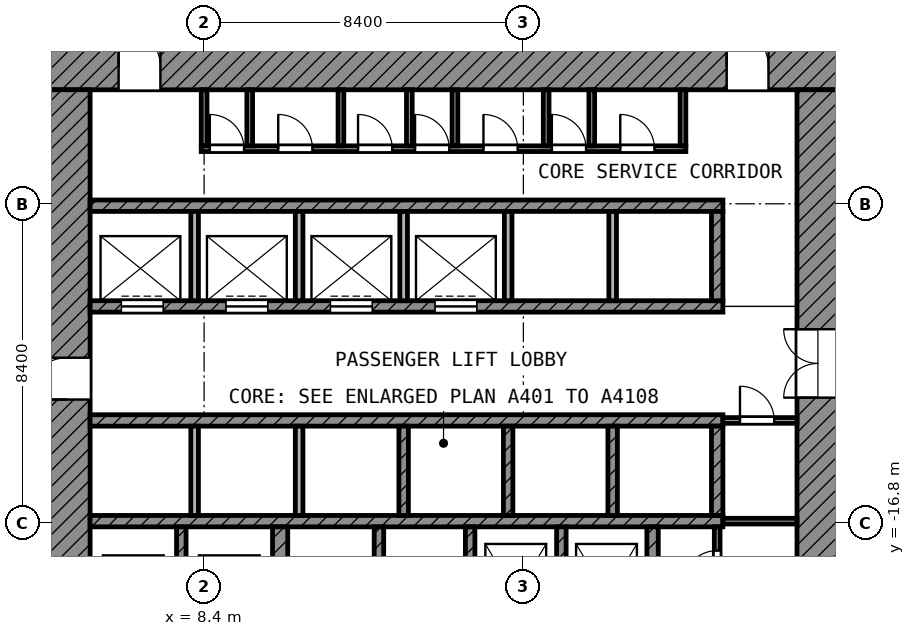
"""IFC4 building model, lengths in metres.
Left out: names, types, materials, properties, quantities, classifications, styles, units other than length and angle.
Written with IfcOpenShell. Run it as: python <this file> out.ifc"""

import sys

from ifc_helpers import new_model, si_unit, direction, frame, frame_2d, origin, place, context, subcontext, project, spatial, rectangle, extrude, element, fill, save


model = new_model("IFC4")
c1 = context("Model", 3, precision=1e-05, world=origin(), true_north=direction((0.0, 1.0)))
c2 = subcontext(c1, "Body", "Model", "MODEL_VIEW")
j1 = project(units=[si_unit("LENGTHUNIT", "METRE"), si_unit("PLANEANGLEUNIT", "RADIAN")], contexts=[c1])
p1 = place(None, origin())
s1 = spatial("IfcSite", under=j1, at=p1, CompositionType="ELEMENT")
p2 = place(p1, origin())
s2 = spatial("IfcBuilding", under=s1, at=p2, CompositionType="ELEMENT")
p3 = place(p2, frame((0.0, 0.0, 47.6)))
s3 = spatial("IfcBuildingStorey", under=s2, at=p3, CompositionType="ELEMENT", Elevation=47.6)
p4 = place(p3, frame((4.2, -4.8, 0.0), z_axis=(0.0, 0.0, 1.0), x_axis=(1.0, 0.0, 0.0)))
e1 = element("IfcWall", 1, at=p4, inside=s3, PredefinedType="SHEAR", context=c2, shape_type="SweptSolid", body=[
    extrude(rectangle(XDim=20.9, YDim=1.2, at=frame_2d((10.45, 0.0))), origin(), (0.0, 0.0, 1.0), 3.78),
])
p5 = place(p4, frame((1.95, 0.0, 0.0)))
e2 = element("IfcOpeningElement", 2, at=p5, cuts=e1, PredefinedType="OPENING", context=c2, shape_type="SweptSolid", body=[
    extrude(rectangle(XDim=1.1, YDim=2.1, at=frame_2d((0.55, 1.05))), frame((0.0, 0.61, 0.0), z_axis=(0.0, -1.0, 0.0), x_axis=(1.0, 0.0, 0.0)), (0.0, 0.0, 1.0), 1.22),
])
p6 = place(p4, frame((17.95, 0.0, 0.0)))
e3 = element("IfcOpeningElement", 3, at=p6, cuts=e1, PredefinedType="OPENING", context=c2, shape_type="SweptSolid", body=[
    extrude(rectangle(XDim=1.1, YDim=2.1, at=frame_2d((0.55, 1.05))), frame((0.0, 0.61, 0.0), z_axis=(0.0, -1.0, 0.0), x_axis=(1.0, 0.0, 0.0)), (0.0, 0.0, 1.0), 1.22),
])
p7 = place(p3, frame((4.8, -25.1, 0.0), z_axis=(0.0, 0.0, 1.0), x_axis=(0.0, 1.0, 0.0)))
e4 = element("IfcWall", 4, at=p7, inside=s3, PredefinedType="SHEAR", context=c2, shape_type="SweptSolid", body=[
    extrude(rectangle(XDim=19.7, YDim=1.2, at=frame_2d((9.85, 0.0))), origin(), (0.0, 0.0, 1.0), 3.78),
])
p8 = place(p7, frame((11.55, 0.0, 0.0)))
e5 = element("IfcOpeningElement", 5, at=p8, cuts=e4, PredefinedType="OPENING", context=c2, shape_type="SweptSolid", body=[
    extrude(rectangle(XDim=1.1, YDim=2.1, at=frame_2d((0.55, 1.05))), frame((0.0, 0.61, 0.0), z_axis=(0.0, -1.0, 0.0), x_axis=(1.0, 0.0, 0.0)), (0.0, 0.0, 1.0), 1.22),
])
p9 = place(p7, frame((2.25, 0.0, 0.0)))
e6 = element("IfcOpeningElement", 6, at=p9, cuts=e4, PredefinedType="OPENING", context=c2, shape_type="SweptSolid", body=[
    extrude(rectangle(XDim=1.1, YDim=2.1, at=frame_2d((0.55, 1.05))), frame((0.0, 0.61, 0.0), z_axis=(0.0, -1.0, 0.0), x_axis=(1.0, 0.0, 0.0)), (0.0, 0.0, 1.0), 1.22),
])
p10 = place(p3, frame((24.55, -24.0, 0.0), z_axis=(0.0, 0.0, 1.0), x_axis=(0.0, 1.0, 0.0)))
e7 = element("IfcWall", 7, at=p10, inside=s3, PredefinedType="SHEAR", context=c2, shape_type="SweptSolid", body=[
    extrude(rectangle(XDim=18.6, YDim=1.1, at=frame_2d((9.3, 0.0))), origin(), (0.0, 0.0, 1.0), 3.78),
])
p11 = place(p10, frame((10.5, 0.0, 0.0)))
e8 = element("IfcOpeningElement", 8, at=p11, cuts=e7, PredefinedType="OPENING", context=c2, shape_type="SweptSolid", body=[
    extrude(rectangle(XDim=1.8, YDim=2.1, at=frame_2d((0.9, 1.05))), frame((0.0, 0.56, 0.0), z_axis=(0.0, -1.0, 0.0), x_axis=(1.0, 0.0, 0.0)), (0.0, 0.0, 1.0), 1.12),
])
p12 = place(p3, frame((5.4, -8.45, 0.0), z_axis=(0.0, 0.0, 1.0), x_axis=(1.0, 0.0, 0.0)))
e9 = element("IfcWall", 9, at=p12, inside=s3, PredefinedType="SHEAR", context=c2, shape_type="SweptSolid", body=[
    extrude(rectangle(XDim=16.65, YDim=0.3, at=frame_2d((8.325, 0.0))), origin(), (0.0, 0.0, 1.0), 3.78),
])
p13 = place(p3, frame((5.4, -11.1, 0.0), z_axis=(0.0, 0.0, 1.0), x_axis=(1.0, 0.0, 0.0)))
e10 = element("IfcWall", 10, at=p13, inside=s3, PredefinedType="SHEAR", context=c2, shape_type="SweptSolid", body=[
    extrude(rectangle(XDim=16.65, YDim=0.3, at=frame_2d((8.325, 0.0))), origin(), (0.0, 0.0, 1.0), 3.78),
])
p14 = place(p13, frame((0.825, 0.0, 0.0)))
e11 = element("IfcOpeningElement", 11, at=p14, cuts=e10, PredefinedType="OPENING", context=c2, shape_type="SweptSolid", body=[
    extrude(rectangle(XDim=1.1, YDim=2.1, at=frame_2d((0.55, 1.05))), frame((0.0, 0.16, 0.0), z_axis=(0.0, -1.0, 0.0), x_axis=(1.0, 0.0, 0.0)), (0.0, 0.0, 1.0), 0.32),
])
p15 = place(p13, frame((3.575, 0.0, 0.0)))
e12 = element("IfcOpeningElement", 12, at=p15, cuts=e10, PredefinedType="OPENING", context=c2, shape_type="SweptSolid", body=[
    extrude(rectangle(XDim=1.1, YDim=2.1, at=frame_2d((0.55, 1.05))), frame((0.0, 0.16, 0.0), z_axis=(0.0, -1.0, 0.0), x_axis=(1.0, 0.0, 0.0)), (0.0, 0.0, 1.0), 0.32),
])
p16 = place(p13, frame((6.325, 0.0, 0.0)))
e13 = element("IfcOpeningElement", 13, at=p16, cuts=e10, PredefinedType="OPENING", context=c2, shape_type="SweptSolid", body=[
    extrude(rectangle(XDim=1.1, YDim=2.1, at=frame_2d((0.55, 1.05))), frame((0.0, 0.16, 0.0), z_axis=(0.0, -1.0, 0.0), x_axis=(1.0, 0.0, 0.0)), (0.0, 0.0, 1.0), 0.32),
])
p17 = place(p13, frame((9.075, 0.0, 0.0)))
e14 = element("IfcOpeningElement", 14, at=p17, cuts=e10, PredefinedType="OPENING", context=c2, shape_type="SweptSolid", body=[
    extrude(rectangle(XDim=1.1, YDim=2.1, at=frame_2d((0.55, 1.05))), frame((0.0, 0.16, 0.0), z_axis=(0.0, -1.0, 0.0), x_axis=(1.0, 0.0, 0.0)), (0.0, 0.0, 1.0), 0.32),
])
for number, where, z_axis, x_axis in (
    (15, (5.4, -14.1, 0.0), (0.0, 0.0, 1.0), (1.0, 0.0, 0.0)),
    (16, (5.4, -16.75, 0.0), (0.0, 0.0, 1.0), (1.0, 0.0, 0.0)),
):
    element("IfcWall", number, at=place(p3, frame(where, z_axis=z_axis, x_axis=x_axis)), inside=s3, PredefinedType="SHEAR", context=c2, shape_type="SweptSolid", body=[
        extrude(rectangle(XDim=16.65, YDim=0.3, at=frame_2d((8.325, 0.0))), origin(), (0.0, 0.0, 1.0), 3.78),
    ])
p18 = place(p3, frame((10.4, -20.05, 0.0), z_axis=(0.0, 0.0, 1.0), x_axis=(0.0, 1.0, 0.0)))
e17 = element("IfcWall", 17, at=p18, inside=s3, PredefinedType="SHEAR", context=c2, shape_type="SweptSolid", body=[
    extrude(rectangle(XDim=3.15, YDim=0.4, at=frame_2d((1.575, 0.0))), origin(), (0.0, 0.0, 1.0), 3.78),
])
p19 = place(p3, frame((20.2, -20.35, 0.0), z_axis=(0.0, 0.0, 1.0), x_axis=(0.0, 1.0, 0.0)))
e18 = element("IfcWall", 18, at=p19, inside=s3, PredefinedType="SHEAR", context=c2, shape_type="SweptSolid", body=[
    extrude(rectangle(XDim=3.45, YDim=0.3, at=frame_2d((1.725, 0.0))), origin(), (0.0, 0.0, 1.0), 3.78),
])
p20 = place(p3, frame((21.9, -10.95, 0.0), z_axis=(0.0, 0.0, 1.0), x_axis=(0.0, 1.0, 0.0)))
e19 = element("IfcWall", 19, at=p20, inside=s3, PredefinedType="SHEAR", context=c2, shape_type="SweptSolid", body=[
    extrude(rectangle(XDim=2.35, YDim=0.3, at=frame_2d((1.175, 0.0))), origin(), (0.0, 0.0, 1.0), 3.78),
])
p21 = place(p3, frame((21.9, -16.6, 0.0), z_axis=(0.0, 0.0, 1.0), x_axis=(0.0, 1.0, 0.0)))
e20 = element("IfcWall", 20, at=p21, inside=s3, PredefinedType="SHEAR", context=c2, shape_type="SweptSolid", body=[
    extrude(rectangle(XDim=2.35, YDim=0.3, at=frame_2d((1.175, 0.0))), origin(), (0.0, 0.0, 1.0), 3.78),
])
for number, where, z_axis, x_axis in (
    (21, (7.8, -20.05, 0.0), (0.0, 0.0, 1.0), (0.0, 1.0, 0.0)),
    (22, (13.0, -20.05, 0.0), (0.0, 0.0, 1.0), (0.0, 1.0, 0.0)),
    (23, (15.4, -20.05, 0.0), (0.0, 0.0, 1.0), (0.0, 1.0, 0.0)),
    (24, (17.8, -20.05, 0.0), (0.0, 0.0, 1.0), (0.0, 1.0, 0.0)),
):
    element("IfcWall", number, at=place(p3, frame(where, z_axis=z_axis, x_axis=x_axis)), inside=s3, PredefinedType="SHEAR", context=c2, shape_type="SweptSolid", body=[
        extrude(rectangle(XDim=3.15, YDim=0.25, at=frame_2d((1.575, 0.0))), origin(), (0.0, 0.0, 1.0), 3.78),
    ])
for number, where, z_axis, x_axis in (
    (25, (8.15, -10.95, 0.0), (0.0, 0.0, 1.0), (0.0, 1.0, 0.0)),
    (26, (10.9, -10.95, 0.0), (0.0, 0.0, 1.0), (0.0, 1.0, 0.0)),
    (27, (13.65, -10.95, 0.0), (0.0, 0.0, 1.0), (0.0, 1.0, 0.0)),
    (28, (16.4, -10.95, 0.0), (0.0, 0.0, 1.0), (0.0, 1.0, 0.0)),
    (29, (19.15, -10.95, 0.0), (0.0, 0.0, 1.0), (0.0, 1.0, 0.0)),
):
    element("IfcWall", number, at=place(p3, frame(where, z_axis=z_axis, x_axis=x_axis)), inside=s3, PredefinedType="PARTITIONING", context=c2, shape_type="SweptSolid", body=[
        extrude(rectangle(XDim=2.35, YDim=0.2, at=frame_2d((1.175, 0.0))), origin(), (0.0, 0.0, 1.0), 3.78),
    ])
for number, where, z_axis, x_axis in (
    (30, (8.15, -16.6, 0.0), (0.0, 0.0, 1.0), (0.0, 1.0, 0.0)),
    (31, (10.9, -16.6, 0.0), (0.0, 0.0, 1.0), (0.0, 1.0, 0.0)),
):
    element("IfcWall", number, at=place(p3, frame(where, z_axis=z_axis, x_axis=x_axis)), inside=s3, PredefinedType="PARTITIONING", context=c2, shape_type="SweptSolid", body=[
        extrude(rectangle(XDim=2.35, YDim=0.2, at=frame_2d((1.175, 0.0))), origin(), (0.0, 0.0, 1.0), 3.78),
    ])
for number, where, z_axis, x_axis in (
    (32, (13.65, -16.6, 0.0), (0.0, 0.0, 1.0), (0.0, 1.0, 0.0)),
    (33, (16.4, -16.6, 0.0), (0.0, 0.0, 1.0), (0.0, 1.0, 0.0)),
    (34, (19.15, -16.6, 0.0), (0.0, 0.0, 1.0), (0.0, 1.0, 0.0)),
):
    element("IfcWall", number, at=place(p3, frame(where, z_axis=z_axis, x_axis=x_axis)), inside=s3, PredefinedType="SHEAR", context=c2, shape_type="SweptSolid", body=[
        extrude(rectangle(XDim=2.35, YDim=0.25, at=frame_2d((1.175, 0.0))), origin(), (0.0, 0.0, 1.0), 3.78),
    ])
p22 = place(p3, frame((21.9, -19.05, 0.0), z_axis=(0.0, 0.0, 1.0), x_axis=(0.0, 1.0, 0.0)))
e35 = element("IfcWall", 35, at=p22, inside=s3, PredefinedType="PARTITIONING", context=c2, shape_type="SweptSolid", body=[
    extrude(rectangle(XDim=2.15, YDim=0.15, at=frame_2d((1.075, 0.0))), origin(), (0.0, 0.0, 1.0), 3.78),
])
p23 = place(p22, frame((0.625, 0.0, 0.0)))
e36 = element("IfcOpeningElement", 36, at=p23, cuts=e35, PredefinedType="OPENING", context=c2, shape_type="SweptSolid", body=[
    extrude(rectangle(XDim=0.9, YDim=2.1, at=frame_2d((0.45, 1.05))), frame((0.0, 0.085, 0.0), z_axis=(0.0, -1.0, 0.0), x_axis=(1.0, 0.0, 0.0)), (0.0, 0.0, 1.0), 0.17),
])
p24 = place(p3, frame((22.05, -16.75, 0.0), z_axis=(0.0, 0.0, 1.0), x_axis=(1.0, 0.0, 0.0)))
e37 = element("IfcWall", 37, at=p24, inside=s3, PredefinedType="PARTITIONING", context=c2, shape_type="SweptSolid", body=[
    extrude(rectangle(XDim=1.95, YDim=0.15, at=frame_2d((0.975, 0.0))), origin(), (0.0, 0.0, 1.0), 3.78),
])
p25 = place(p3, frame((22.05, -14.1, 0.0), z_axis=(0.0, 0.0, 1.0), x_axis=(1.0, 0.0, 0.0)))
e38 = element("IfcWall", 38, at=p25, inside=s3, PredefinedType="PARTITIONING", context=c2, shape_type="SweptSolid", body=[
    extrude(rectangle(XDim=1.95, YDim=0.15, at=frame_2d((0.975, 0.0))), origin(), (0.0, 0.0, 1.0), 3.78),
])
p26 = place(p25, frame((0.45, 0.0, 0.0)))
e39 = element("IfcOpeningElement", 39, at=p26, cuts=e38, PredefinedType="OPENING", context=c2, shape_type="SweptSolid", body=[
    extrude(rectangle(XDim=0.9, YDim=2.1, at=frame_2d((0.45, 1.05))), frame((0.0, 0.085, 0.0), z_axis=(0.0, -1.0, 0.0), x_axis=(1.0, 0.0, 0.0)), (0.0, 0.0, 1.0), 0.17),
])
p27 = place(p3, frame((8.325, -6.95, 0.0), z_axis=(0.0, 0.0, 1.0), x_axis=(1.0, 0.0, 0.0)))
e40 = element("IfcWall", 40, at=p27, inside=s3, PredefinedType="PARTITIONING", context=c2, shape_type="SweptSolid", body=[
    extrude(rectangle(XDim=12.75, YDim=0.15, at=frame_2d((6.375, 0.0))), origin(), (0.0, 0.0, 1.0), 3.78),
])
p28 = place(p27, frame((0.225, 0.0, 0.0)))
e41 = element("IfcOpeningElement", 41, at=p28, cuts=e40, PredefinedType="OPENING", context=c2, shape_type="SweptSolid", body=[
    extrude(rectangle(XDim=0.9, YDim=2.1, at=frame_2d((0.45, 1.05))), frame((0.0, 0.085, 0.0), z_axis=(0.0, -1.0, 0.0), x_axis=(1.0, 0.0, 0.0)), (0.0, 0.0, 1.0), 0.17),
])
p29 = place(p27, frame((2.025, 0.0, 0.0)))
e42 = element("IfcOpeningElement", 42, at=p29, cuts=e40, PredefinedType="OPENING", context=c2, shape_type="SweptSolid", body=[
    extrude(rectangle(XDim=0.9, YDim=2.1, at=frame_2d((0.45, 1.05))), frame((0.0, 0.085, 0.0), z_axis=(0.0, -1.0, 0.0), x_axis=(1.0, 0.0, 0.0)), (0.0, 0.0, 1.0), 0.17),
])
p30 = place(p27, frame((4.125, 0.0, 0.0)))
e43 = element("IfcOpeningElement", 43, at=p30, cuts=e40, PredefinedType="OPENING", context=c2, shape_type="SweptSolid", body=[
    extrude(rectangle(XDim=0.9, YDim=2.1, at=frame_2d((0.45, 1.05))), frame((0.0, 0.085, 0.0), z_axis=(0.0, -1.0, 0.0), x_axis=(1.0, 0.0, 0.0)), (0.0, 0.0, 1.0), 0.17),
])
p31 = place(p27, frame((5.625, 0.0, 0.0)))
e44 = element("IfcOpeningElement", 44, at=p31, cuts=e40, PredefinedType="OPENING", context=c2, shape_type="SweptSolid", body=[
    extrude(rectangle(XDim=0.9, YDim=2.1, at=frame_2d((0.45, 1.05))), frame((0.0, 0.085, 0.0), z_axis=(0.0, -1.0, 0.0), x_axis=(1.0, 0.0, 0.0)), (0.0, 0.0, 1.0), 0.17),
])
p32 = place(p27, frame((7.425, 0.0, 0.0)))
e45 = element("IfcOpeningElement", 45, at=p32, cuts=e40, PredefinedType="OPENING", context=c2, shape_type="SweptSolid", body=[
    extrude(rectangle(XDim=0.9, YDim=2.1, at=frame_2d((0.45, 1.05))), frame((0.0, 0.085, 0.0), z_axis=(0.0, -1.0, 0.0), x_axis=(1.0, 0.0, 0.0)), (0.0, 0.0, 1.0), 0.17),
])
p33 = place(p27, frame((9.225, 0.0, 0.0)))
e46 = element("IfcOpeningElement", 46, at=p33, cuts=e40, PredefinedType="OPENING", context=c2, shape_type="SweptSolid", body=[
    extrude(rectangle(XDim=0.9, YDim=2.1, at=frame_2d((0.45, 1.05))), frame((0.0, 0.085, 0.0), z_axis=(0.0, -1.0, 0.0), x_axis=(1.0, 0.0, 0.0)), (0.0, 0.0, 1.0), 0.17),
])
p34 = place(p27, frame((11.025, 0.0, 0.0)))
e47 = element("IfcOpeningElement", 47, at=p34, cuts=e40, PredefinedType="OPENING", context=c2, shape_type="SweptSolid", body=[
    extrude(rectangle(XDim=0.9, YDim=2.1, at=frame_2d((0.45, 1.05))), frame((0.0, 0.085, 0.0), z_axis=(0.0, -1.0, 0.0), x_axis=(1.0, 0.0, 0.0)), (0.0, 0.0, 1.0), 0.17),
])
for number, where, z_axis, x_axis in (
    (48, (8.4, -6.875, 0.0), (0.0, 0.0, 1.0), (0.0, 1.0, 0.0)),
    (49, (9.6, -6.875, 0.0), (0.0, 0.0, 1.0), (0.0, 1.0, 0.0)),
    (50, (12.0, -6.875, 0.0), (0.0, 0.0, 1.0), (0.0, 1.0, 0.0)),
    (51, (13.8, -6.875, 0.0), (0.0, 0.0, 1.0), (0.0, 1.0, 0.0)),
    (52, (15.0, -6.875, 0.0), (0.0, 0.0, 1.0), (0.0, 1.0, 0.0)),
    (53, (17.4, -6.875, 0.0), (0.0, 0.0, 1.0), (0.0, 1.0, 0.0)),
    (54, (18.6, -6.875, 0.0), (0.0, 0.0, 1.0), (0.0, 1.0, 0.0)),
    (55, (21.0, -6.875, 0.0), (0.0, 0.0, 1.0), (0.0, 1.0, 0.0)),
):
    element("IfcWall", number, at=place(p3, frame(where, z_axis=z_axis, x_axis=x_axis)), inside=s3, PredefinedType="PARTITIONING", context=c2, shape_type="SweptSolid", body=[
        extrude(rectangle(XDim=1.475, YDim=0.15, at=frame_2d((0.738, 0.0))), origin(), (0.0, 0.0, 1.0), 3.78),
    ])
p35 = place(p14, origin())
e56 = element("IfcDoor", 56, at=p35, inside=s3, OperationType="DOUBLE_DOOR_SLIDING", PredefinedType="DOOR", context=c2, shape_type="SweptSolid", body=[
    extrude(rectangle(XDim=1.1, YDim=2.1, at=frame_2d((0.55, 1.05))), frame((0.0, 0.025, 0.0), z_axis=(0.0, -1.0, 0.0), x_axis=(1.0, 0.0, 0.0)), (0.0, 0.0, 1.0), 0.05),
])
fill(e11, e56)
p36 = place(p15, origin())
e57 = element("IfcDoor", 57, at=p36, inside=s3, OperationType="DOUBLE_DOOR_SLIDING", PredefinedType="DOOR", context=c2, shape_type="SweptSolid", body=[
    extrude(rectangle(XDim=1.1, YDim=2.1, at=frame_2d((0.55, 1.05))), frame((0.0, 0.025, 0.0), z_axis=(0.0, -1.0, 0.0), x_axis=(1.0, 0.0, 0.0)), (0.0, 0.0, 1.0), 0.05),
])
fill(e12, e57)
p37 = place(p16, origin())
e58 = element("IfcDoor", 58, at=p37, inside=s3, OperationType="DOUBLE_DOOR_SLIDING", PredefinedType="DOOR", context=c2, shape_type="SweptSolid", body=[
    extrude(rectangle(XDim=1.1, YDim=2.1, at=frame_2d((0.55, 1.05))), frame((0.0, 0.025, 0.0), z_axis=(0.0, -1.0, 0.0), x_axis=(1.0, 0.0, 0.0)), (0.0, 0.0, 1.0), 0.05),
])
fill(e13, e58)
p38 = place(p17, origin())
e59 = element("IfcDoor", 59, at=p38, inside=s3, OperationType="DOUBLE_DOOR_SLIDING", PredefinedType="DOOR", context=c2, shape_type="SweptSolid", body=[
    extrude(rectangle(XDim=1.1, YDim=2.1, at=frame_2d((0.55, 1.05))), frame((0.0, 0.025, 0.0), z_axis=(0.0, -1.0, 0.0), x_axis=(1.0, 0.0, 0.0)), (0.0, 0.0, 1.0), 0.05),
])
fill(e14, e59)
p39 = place(p8, origin())
e60 = element("IfcDoor", 60, at=p39, inside=s3, OperationType="SINGLE_SWING_LEFT", PredefinedType="DOOR", context=c2, shape_type="SweptSolid", body=[
    extrude(rectangle(XDim=1.1, YDim=2.1, at=frame_2d((0.55, 1.05))), frame((0.0, 0.025, 0.0), z_axis=(0.0, -1.0, 0.0), x_axis=(1.0, 0.0, 0.0)), (0.0, 0.0, 1.0), 0.05),
])
fill(e5, e60)
p40 = place(p5, origin())
e61 = element("IfcDoor", 61, at=p40, inside=s3, OperationType="SINGLE_SWING_LEFT", PredefinedType="DOOR", context=c2, shape_type="SweptSolid", body=[
    extrude(rectangle(XDim=1.1, YDim=2.1, at=frame_2d((0.55, 1.05))), frame((0.0, 0.025, 0.0), z_axis=(0.0, -1.0, 0.0), x_axis=(1.0, 0.0, 0.0)), (0.0, 0.0, 1.0), 0.05),
])
fill(e2, e61)
p41 = place(p6, origin())
e62 = element("IfcDoor", 62, at=p41, inside=s3, OperationType="SINGLE_SWING_LEFT", PredefinedType="DOOR", context=c2, shape_type="SweptSolid", body=[
    extrude(rectangle(XDim=1.1, YDim=2.1, at=frame_2d((0.55, 1.05))), frame((0.0, 0.025, 0.0), z_axis=(0.0, -1.0, 0.0), x_axis=(1.0, 0.0, 0.0)), (0.0, 0.0, 1.0), 0.05),
])
fill(e3, e62)
p42 = place(p11, origin())
e63 = element("IfcDoor", 63, at=p42, inside=s3, OperationType="DOUBLE_DOOR_SINGLE_SWING", PredefinedType="DOOR", context=c2, shape_type="SweptSolid", body=[
    extrude(rectangle(XDim=1.8, YDim=2.1, at=frame_2d((0.9, 1.05))), frame((0.0, 0.025, 0.0), z_axis=(0.0, -1.0, 0.0), x_axis=(1.0, 0.0, 0.0)), (0.0, 0.0, 1.0), 0.05),
])
fill(e8, e63)
p43 = place(p28, origin())
e64 = element("IfcDoor", 64, at=p43, inside=s3, OperationType="SINGLE_SWING_LEFT", PredefinedType="DOOR", context=c2, shape_type="SweptSolid", body=[
    extrude(rectangle(XDim=0.9, YDim=2.1, at=frame_2d((0.45, 1.05))), frame((0.0, 0.025, 0.0), z_axis=(0.0, -1.0, 0.0), x_axis=(1.0, 0.0, 0.0)), (0.0, 0.0, 1.0), 0.05),
])
fill(e41, e64)
p44 = place(p29, origin())
e65 = element("IfcDoor", 65, at=p44, inside=s3, OperationType="SINGLE_SWING_LEFT", PredefinedType="DOOR", context=c2, shape_type="SweptSolid", body=[
    extrude(rectangle(XDim=0.9, YDim=2.1, at=frame_2d((0.45, 1.05))), frame((0.0, 0.025, 0.0), z_axis=(0.0, -1.0, 0.0), x_axis=(1.0, 0.0, 0.0)), (0.0, 0.0, 1.0), 0.05),
])
fill(e42, e65)
p45 = place(p30, origin())
e66 = element("IfcDoor", 66, at=p45, inside=s3, OperationType="SINGLE_SWING_LEFT", PredefinedType="DOOR", context=c2, shape_type="SweptSolid", body=[
    extrude(rectangle(XDim=0.9, YDim=2.1, at=frame_2d((0.45, 1.05))), frame((0.0, 0.025, 0.0), z_axis=(0.0, -1.0, 0.0), x_axis=(1.0, 0.0, 0.0)), (0.0, 0.0, 1.0), 0.05),
])
fill(e43, e66)
p46 = place(p31, origin())
e67 = element("IfcDoor", 67, at=p46, inside=s3, OperationType="SINGLE_SWING_LEFT", PredefinedType="DOOR", context=c2, shape_type="SweptSolid", body=[
    extrude(rectangle(XDim=0.9, YDim=2.1, at=frame_2d((0.45, 1.05))), frame((0.0, 0.025, 0.0), z_axis=(0.0, -1.0, 0.0), x_axis=(1.0, 0.0, 0.0)), (0.0, 0.0, 1.0), 0.05),
])
fill(e44, e67)
p47 = place(p32, origin())
e68 = element("IfcDoor", 68, at=p47, inside=s3, OperationType="SINGLE_SWING_LEFT", PredefinedType="DOOR", context=c2, shape_type="SweptSolid", body=[
    extrude(rectangle(XDim=0.9, YDim=2.1, at=frame_2d((0.45, 1.05))), frame((0.0, 0.025, 0.0), z_axis=(0.0, -1.0, 0.0), x_axis=(1.0, 0.0, 0.0)), (0.0, 0.0, 1.0), 0.05),
])
fill(e45, e68)
p48 = place(p33, origin())
e69 = element("IfcDoor", 69, at=p48, inside=s3, OperationType="SINGLE_SWING_LEFT", PredefinedType="DOOR", context=c2, shape_type="SweptSolid", body=[
    extrude(rectangle(XDim=0.9, YDim=2.1, at=frame_2d((0.45, 1.05))), frame((0.0, 0.025, 0.0), z_axis=(0.0, -1.0, 0.0), x_axis=(1.0, 0.0, 0.0)), (0.0, 0.0, 1.0), 0.05),
])
fill(e46, e69)
p49 = place(p34, origin())
e70 = element("IfcDoor", 70, at=p49, inside=s3, OperationType="SINGLE_SWING_LEFT", PredefinedType="DOOR", context=c2, shape_type="SweptSolid", body=[
    extrude(rectangle(XDim=0.9, YDim=2.1, at=frame_2d((0.45, 1.05))), frame((0.0, 0.025, 0.0), z_axis=(0.0, -1.0, 0.0), x_axis=(1.0, 0.0, 0.0)), (0.0, 0.0, 1.0), 0.05),
])
fill(e47, e70)
p50 = place(p26, origin())
e71 = element("IfcDoor", 71, at=p50, inside=s3, OperationType="SINGLE_SWING_LEFT", PredefinedType="DOOR", context=c2, shape_type="SweptSolid", body=[
    extrude(rectangle(XDim=0.9, YDim=2.1, at=frame_2d((0.45, 1.05))), frame((0.0, 0.025, 0.0), z_axis=(0.0, -1.0, 0.0), x_axis=(1.0, 0.0, 0.0)), (0.0, 0.0, 1.0), 0.05),
])
fill(e39, e71)
p51 = place(p23, origin())
e72 = element("IfcDoor", 72, at=p51, inside=s3, OperationType="SINGLE_SWING_LEFT", PredefinedType="DOOR", context=c2, shape_type="SweptSolid", body=[
    extrude(rectangle(XDim=0.9, YDim=2.1, at=frame_2d((0.45, 1.05))), frame((0.0, 0.025, 0.0), z_axis=(0.0, -1.0, 0.0), x_axis=(1.0, 0.0, 0.0)), (0.0, 0.0, 1.0), 0.05),
])
fill(e36, e72)
save(model, sys.argv[1])
